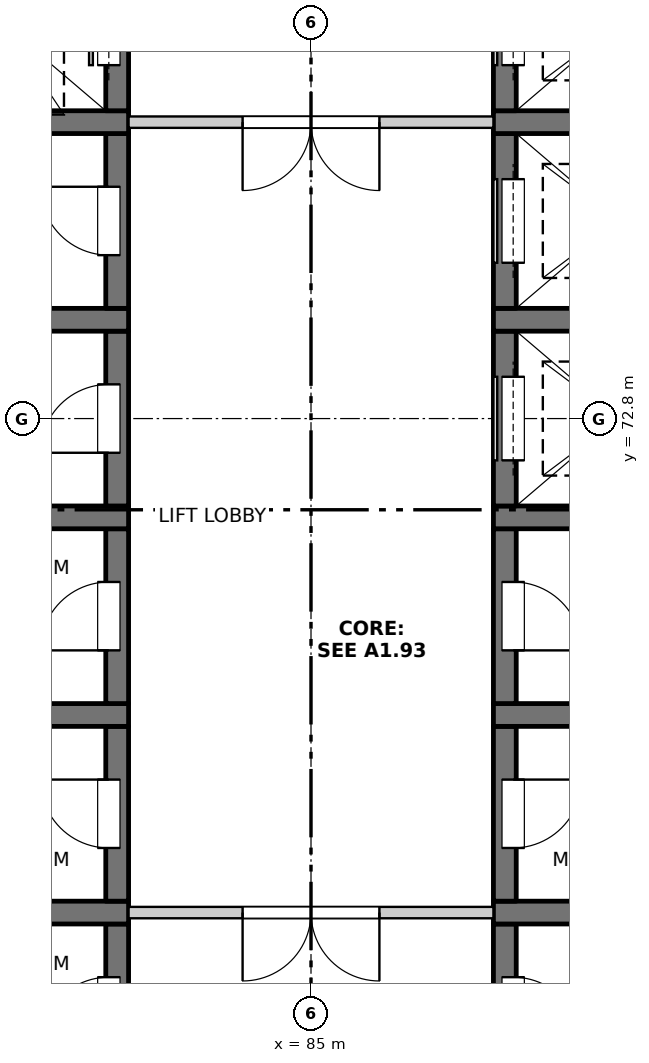
"""IFC4 building model, lengths in metres.
Left out: names, types, materials, properties, quantities, classifications, styles, units other than length and angle.
Written with IfcOpenShell. Run it as: python <this file> out.ifc"""

import sys

from ifc_helpers import new_model, si_unit, direction, frame, frame_2d, origin, place, context, subcontext, project, spatial, rectangle, extrude, element, fill, save


model = new_model("IFC4")
c1 = context("Model", 3, precision=1e-05, world=origin(), true_north=direction((0.0, 1.0)))
c2 = subcontext(c1, "Body", "Model", "MODEL_VIEW")
j1 = project(units=[si_unit("LENGTHUNIT", "METRE"), si_unit("PLANEANGLEUNIT", "RADIAN")], contexts=[c1])
p1 = place(None, origin())
s1 = spatial("IfcSite", under=j1, at=p1, CompositionType="ELEMENT")
p2 = place(p1, origin())
s2 = spatial("IfcBuilding", under=s1, at=p2, CompositionType="ELEMENT")
p3 = place(p2, frame((0.0, 0.0, 155.4)))
s3 = spatial("IfcBuildingStorey", under=s2, at=p3, CompositionType="ELEMENT", Elevation=155.4)
p4 = place(p3, frame((82.45, 63.85, -0.25), z_axis=(0.0, 0.0, 1.0), x_axis=(0.0, 1.0, 0.0)))
e1 = element("IfcWall", 1, at=p4, inside=s3, PredefinedType="SOLIDWALL", context=c2, shape_type="SweptSolid", body=[
    extrude(rectangle(XDim=2.3, YDim=0.3, at=frame_2d((1.15, 0.0))), origin(), (0.0, 0.0, 1.0), 3.4),
])
p5 = place(p4, frame((0.7, 0.0, 0.25)))
e2 = element("IfcOpeningElement", 2, at=p5, cuts=e1, PredefinedType="OPENING", context=c2, shape_type="SweptSolid", body=[
    extrude(rectangle(XDim=0.9, YDim=2.1, at=frame_2d((0.45, 1.05))), frame((0.0, 0.16, 0.0), z_axis=(0.0, -1.0, 0.0), x_axis=(1.0, 0.0, 0.0)), (0.0, 0.0, 1.0), 0.32),
])
p6 = place(p3, frame((79.6, 66.3, -0.25), z_axis=(0.0, 0.0, 1.0), x_axis=(1.0, 0.0, 0.0)))
e3 = element("IfcWall", 3, at=p6, inside=s3, PredefinedType="SOLIDWALL", context=c2, shape_type="SweptSolid", body=[
    extrude(rectangle(XDim=3.0, YDim=0.3, at=frame_2d((1.5, 0.0))), origin(), (0.0, 0.0, 1.0), 3.4),
])
p7 = place(p3, frame((82.45, 66.45, -0.25), z_axis=(0.0, 0.0, 1.0), x_axis=(0.0, 1.0, 0.0)))
e4 = element("IfcWall", 4, at=p7, inside=s3, PredefinedType="SOLIDWALL", context=c2, shape_type="SweptSolid", body=[
    extrude(rectangle(XDim=2.3, YDim=0.3, at=frame_2d((1.15, 0.0))), origin(), (0.0, 0.0, 1.0), 3.4),
])
p8 = place(p7, frame((0.7, 0.0, 0.25)))
e5 = element("IfcOpeningElement", 5, at=p8, cuts=e4, PredefinedType="OPENING", context=c2, shape_type="SweptSolid", body=[
    extrude(rectangle(XDim=0.9, YDim=2.1, at=frame_2d((0.45, 1.05))), frame((0.0, 0.16, 0.0), z_axis=(0.0, -1.0, 0.0), x_axis=(1.0, 0.0, 0.0)), (0.0, 0.0, 1.0), 0.32),
])
p9 = place(p3, frame((79.6, 68.9, -0.25), z_axis=(0.0, 0.0, 1.0), x_axis=(1.0, 0.0, 0.0)))
e6 = element("IfcWall", 6, at=p9, inside=s3, PredefinedType="SOLIDWALL", context=c2, shape_type="SweptSolid", body=[
    extrude(rectangle(XDim=3.0, YDim=0.3, at=frame_2d((1.5, 0.0))), origin(), (0.0, 0.0, 1.0), 3.4),
])
p10 = place(p3, frame((82.45, 69.05, -0.25), z_axis=(0.0, 0.0, 1.0), x_axis=(0.0, 1.0, 0.0)))
e7 = element("IfcWall", 7, at=p10, inside=s3, PredefinedType="SOLIDWALL", context=c2, shape_type="SweptSolid", body=[
    extrude(rectangle(XDim=2.3, YDim=0.3, at=frame_2d((1.15, 0.0))), origin(), (0.0, 0.0, 1.0), 3.4),
])
p11 = place(p10, frame((0.7, 0.0, 0.25)))
e8 = element("IfcOpeningElement", 8, at=p11, cuts=e7, PredefinedType="OPENING", context=c2, shape_type="SweptSolid", body=[
    extrude(rectangle(XDim=0.9, YDim=2.1, at=frame_2d((0.45, 1.05))), frame((0.0, 0.16, 0.0), z_axis=(0.0, -1.0, 0.0), x_axis=(1.0, 0.0, 0.0)), (0.0, 0.0, 1.0), 0.32),
])
p12 = place(p3, frame((79.6, 71.5, -0.25), z_axis=(0.0, 0.0, 1.0), x_axis=(1.0, 0.0, 0.0)))
e9 = element("IfcWall", 9, at=p12, inside=s3, PredefinedType="SOLIDWALL", context=c2, shape_type="SweptSolid", body=[
    extrude(rectangle(XDim=3.0, YDim=0.3, at=frame_2d((1.5, 0.0))), origin(), (0.0, 0.0, 1.0), 3.4),
])
p13 = place(p3, frame((82.45, 71.65, -0.25), z_axis=(0.0, 0.0, 1.0), x_axis=(0.0, 1.0, 0.0)))
e10 = element("IfcWall", 10, at=p13, inside=s3, PredefinedType="SOLIDWALL", context=c2, shape_type="SweptSolid", body=[
    extrude(rectangle(XDim=2.3, YDim=0.3, at=frame_2d((1.15, 0.0))), origin(), (0.0, 0.0, 1.0), 3.4),
])
p14 = place(p13, frame((0.7, 0.0, 0.25)))
e11 = element("IfcOpeningElement", 11, at=p14, cuts=e10, PredefinedType="OPENING", context=c2, shape_type="SweptSolid", body=[
    extrude(rectangle(XDim=0.9, YDim=2.1, at=frame_2d((0.45, 1.05))), frame((0.0, 0.16, 0.0), z_axis=(0.0, -1.0, 0.0), x_axis=(1.0, 0.0, 0.0)), (0.0, 0.0, 1.0), 0.32),
])
p15 = place(p3, frame((79.6, 74.1, -0.25), z_axis=(0.0, 0.0, 1.0), x_axis=(1.0, 0.0, 0.0)))
e12 = element("IfcWall", 12, at=p15, inside=s3, PredefinedType="SOLIDWALL", context=c2, shape_type="SweptSolid", body=[
    extrude(rectangle(XDim=3.0, YDim=0.3, at=frame_2d((1.5, 0.0))), origin(), (0.0, 0.0, 1.0), 3.4),
])
p16 = place(p3, frame((82.45, 74.25, -0.25), z_axis=(0.0, 0.0, 1.0), x_axis=(0.0, 1.0, 0.0)))
e13 = element("IfcWall", 13, at=p16, inside=s3, PredefinedType="SOLIDWALL", context=c2, shape_type="SweptSolid", body=[
    extrude(rectangle(XDim=2.3, YDim=0.3, at=frame_2d((1.15, 0.0))), origin(), (0.0, 0.0, 1.0), 3.4),
])
p17 = place(p16, frame((0.7, 0.0, 0.25)))
e14 = element("IfcOpeningElement", 14, at=p17, cuts=e13, PredefinedType="OPENING", context=c2, shape_type="SweptSolid", body=[
    extrude(rectangle(XDim=0.9, YDim=2.1, at=frame_2d((0.45, 1.05))), frame((0.0, 0.16, 0.0), z_axis=(0.0, -1.0, 0.0), x_axis=(1.0, 0.0, 0.0)), (0.0, 0.0, 1.0), 0.32),
])
p18 = place(p3, frame((79.6, 76.7, -0.25), z_axis=(0.0, 0.0, 1.0), x_axis=(1.0, 0.0, 0.0)))
e15 = element("IfcWall", 15, at=p18, inside=s3, PredefinedType="SOLIDWALL", context=c2, shape_type="SweptSolid", body=[
    extrude(rectangle(XDim=3.0, YDim=0.3, at=frame_2d((1.5, 0.0))), origin(), (0.0, 0.0, 1.0), 3.4),
])
p19 = place(p3, frame((82.45, 76.85, -0.25), z_axis=(0.0, 0.0, 1.0), x_axis=(0.0, 1.0, 0.0)))
e16 = element("IfcWall", 16, at=p19, inside=s3, PredefinedType="SOLIDWALL", context=c2, shape_type="SweptSolid", body=[
    extrude(rectangle(XDim=2.3, YDim=0.3, at=frame_2d((1.15, 0.0))), origin(), (0.0, 0.0, 1.0), 3.4),
])
p20 = place(p19, frame((0.6, 0.0, 0.25)))
e17 = element("IfcOpeningElement", 17, at=p20, cuts=e16, PredefinedType="OPENING", context=c2, shape_type="SweptSolid", body=[
    extrude(rectangle(XDim=1.1, YDim=2.1, at=frame_2d((0.55, 1.05))), frame((0.0, 0.16, 0.0), z_axis=(0.0, -1.0, 0.0), x_axis=(1.0, 0.0, 0.0)), (0.0, 0.0, 1.0), 0.32),
])
p21 = place(p3, frame((87.55, 63.85, -0.25), z_axis=(0.0, 0.0, 1.0), x_axis=(0.0, 1.0, 0.0)))
e18 = element("IfcWall", 18, at=p21, inside=s3, PredefinedType="SOLIDWALL", context=c2, shape_type="SweptSolid", body=[
    extrude(rectangle(XDim=2.3, YDim=0.3, at=frame_2d((1.15, 0.0))), origin(), (0.0, 0.0, 1.0), 3.4),
])
p22 = place(p21, frame((0.7, 0.0, 0.25)))
e19 = element("IfcOpeningElement", 19, at=p22, cuts=e18, PredefinedType="OPENING", context=c2, shape_type="SweptSolid", body=[
    extrude(rectangle(XDim=0.9, YDim=2.1, at=frame_2d((0.45, 1.05))), frame((0.0, 0.16, 0.0), z_axis=(0.0, -1.0, 0.0), x_axis=(1.0, 0.0, 0.0)), (0.0, 0.0, 1.0), 0.32),
])
p23 = place(p3, frame((87.4, 66.3, -0.25), z_axis=(0.0, 0.0, 1.0), x_axis=(1.0, 0.0, 0.0)))
e20 = element("IfcWall", 20, at=p23, inside=s3, PredefinedType="SOLIDWALL", context=c2, shape_type="SweptSolid", body=[
    extrude(rectangle(XDim=3.0, YDim=0.3, at=frame_2d((1.5, 0.0))), origin(), (0.0, 0.0, 1.0), 3.4),
])
p24 = place(p3, frame((87.55, 66.45, -0.25), z_axis=(0.0, 0.0, 1.0), x_axis=(0.0, 1.0, 0.0)))
e21 = element("IfcWall", 21, at=p24, inside=s3, PredefinedType="SOLIDWALL", context=c2, shape_type="SweptSolid", body=[
    extrude(rectangle(XDim=2.3, YDim=0.3, at=frame_2d((1.15, 0.0))), origin(), (0.0, 0.0, 1.0), 3.4),
])
p25 = place(p24, frame((0.7, 0.0, 0.25)))
e22 = element("IfcOpeningElement", 22, at=p25, cuts=e21, PredefinedType="OPENING", context=c2, shape_type="SweptSolid", body=[
    extrude(rectangle(XDim=0.9, YDim=2.1, at=frame_2d((0.45, 1.05))), frame((0.0, 0.16, 0.0), z_axis=(0.0, -1.0, 0.0), x_axis=(1.0, 0.0, 0.0)), (0.0, 0.0, 1.0), 0.32),
])
p26 = place(p3, frame((87.4, 68.9, -0.25), z_axis=(0.0, 0.0, 1.0), x_axis=(1.0, 0.0, 0.0)))
e23 = element("IfcWall", 23, at=p26, inside=s3, PredefinedType="SOLIDWALL", context=c2, shape_type="SweptSolid", body=[
    extrude(rectangle(XDim=3.0, YDim=0.3, at=frame_2d((1.5, 0.0))), origin(), (0.0, 0.0, 1.0), 3.4),
])
p27 = place(p3, frame((87.55, 69.05, -0.25), z_axis=(0.0, 0.0, 1.0), x_axis=(0.0, 1.0, 0.0)))
e24 = element("IfcWall", 24, at=p27, inside=s3, PredefinedType="SOLIDWALL", context=c2, shape_type="SweptSolid", body=[
    extrude(rectangle(XDim=2.3, YDim=0.3, at=frame_2d((1.15, 0.0))), origin(), (0.0, 0.0, 1.0), 3.4),
])
p28 = place(p27, frame((0.7, 0.0, 0.25)))
e25 = element("IfcOpeningElement", 25, at=p28, cuts=e24, PredefinedType="OPENING", context=c2, shape_type="SweptSolid", body=[
    extrude(rectangle(XDim=0.9, YDim=2.1, at=frame_2d((0.45, 1.05))), frame((0.0, 0.16, 0.0), z_axis=(0.0, -1.0, 0.0), x_axis=(1.0, 0.0, 0.0)), (0.0, 0.0, 1.0), 0.32),
])
p29 = place(p3, frame((87.4, 71.5, -0.25), z_axis=(0.0, 0.0, 1.0), x_axis=(1.0, 0.0, 0.0)))
e26 = element("IfcWall", 26, at=p29, inside=s3, PredefinedType="SOLIDWALL", context=c2, shape_type="SweptSolid", body=[
    extrude(rectangle(XDim=3.0, YDim=0.3, at=frame_2d((1.5, 0.0))), origin(), (0.0, 0.0, 1.0), 3.4),
])
p30 = place(p3, frame((87.55, 71.65, -0.25), z_axis=(0.0, 0.0, 1.0), x_axis=(0.0, 1.0, 0.0)))
e27 = element("IfcWall", 27, at=p30, inside=s3, PredefinedType="SOLIDWALL", context=c2, shape_type="SweptSolid", body=[
    extrude(rectangle(XDim=2.3, YDim=0.3, at=frame_2d((1.15, 0.0))), origin(), (0.0, 0.0, 1.0), 3.4),
])
p31 = place(p30, frame((0.6, 0.0, 0.25)))
e28 = element("IfcOpeningElement", 28, at=p31, cuts=e27, PredefinedType="OPENING", context=c2, shape_type="SweptSolid", body=[
    extrude(rectangle(XDim=1.1, YDim=2.1, at=frame_2d((0.55, 1.05))), frame((0.0, 0.16, 0.0), z_axis=(0.0, -1.0, 0.0), x_axis=(1.0, 0.0, 0.0)), (0.0, 0.0, 1.0), 0.32),
])
p32 = place(p3, frame((87.4, 74.1, -0.25), z_axis=(0.0, 0.0, 1.0), x_axis=(1.0, 0.0, 0.0)))
e29 = element("IfcWall", 29, at=p32, inside=s3, PredefinedType="SOLIDWALL", context=c2, shape_type="SweptSolid", body=[
    extrude(rectangle(XDim=3.0, YDim=0.3, at=frame_2d((1.5, 0.0))), origin(), (0.0, 0.0, 1.0), 3.4),
])
p33 = place(p3, frame((87.55, 74.25, -0.25), z_axis=(0.0, 0.0, 1.0), x_axis=(0.0, 1.0, 0.0)))
e30 = element("IfcWall", 30, at=p33, inside=s3, PredefinedType="SOLIDWALL", context=c2, shape_type="SweptSolid", body=[
    extrude(rectangle(XDim=2.3, YDim=0.3, at=frame_2d((1.15, 0.0))), origin(), (0.0, 0.0, 1.0), 3.4),
])
p34 = place(p33, frame((0.6, 0.0, 0.25)))
e31 = element("IfcOpeningElement", 31, at=p34, cuts=e30, PredefinedType="OPENING", context=c2, shape_type="SweptSolid", body=[
    extrude(rectangle(XDim=1.1, YDim=2.1, at=frame_2d((0.55, 1.05))), frame((0.0, 0.16, 0.0), z_axis=(0.0, -1.0, 0.0), x_axis=(1.0, 0.0, 0.0)), (0.0, 0.0, 1.0), 0.32),
])
p35 = place(p3, frame((87.4, 76.7, -0.25), z_axis=(0.0, 0.0, 1.0), x_axis=(1.0, 0.0, 0.0)))
e32 = element("IfcWall", 32, at=p35, inside=s3, PredefinedType="SOLIDWALL", context=c2, shape_type="SweptSolid", body=[
    extrude(rectangle(XDim=3.0, YDim=0.3, at=frame_2d((1.5, 0.0))), origin(), (0.0, 0.0, 1.0), 3.4),
])
p36 = place(p3, frame((87.55, 76.85, -0.25), z_axis=(0.0, 0.0, 1.0), x_axis=(0.0, 1.0, 0.0)))
e33 = element("IfcWall", 33, at=p36, inside=s3, PredefinedType="SOLIDWALL", context=c2, shape_type="SweptSolid", body=[
    extrude(rectangle(XDim=2.3, YDim=0.3, at=frame_2d((1.15, 0.0))), origin(), (0.0, 0.0, 1.0), 3.4),
])
p37 = place(p36, frame((0.6, 0.0, 0.25)))
e34 = element("IfcOpeningElement", 34, at=p37, cuts=e33, PredefinedType="OPENING", context=c2, shape_type="SweptSolid", body=[
    extrude(rectangle(XDim=1.1, YDim=2.1, at=frame_2d((0.55, 1.05))), frame((0.0, 0.16, 0.0), z_axis=(0.0, -1.0, 0.0), x_axis=(1.0, 0.0, 0.0)), (0.0, 0.0, 1.0), 0.32),
])
p38 = place(p3, frame((82.6, 66.3, 0.0), z_axis=(0.0, 0.0, 1.0), x_axis=(1.0, 0.0, 0.0)))
e35 = element("IfcWall", 35, at=p38, inside=s3, PredefinedType="PARTITIONING", context=c2, shape_type="SweptSolid", body=[
    extrude(rectangle(XDim=4.8, YDim=0.15, at=frame_2d((2.4, 0.0))), origin(), (0.0, 0.0, 1.0), 3.15),
])
p39 = place(p38, frame((1.5, 0.0, 0.0)))
e36 = element("IfcOpeningElement", 36, at=p39, cuts=e35, PredefinedType="OPENING", context=c2, shape_type="SweptSolid", body=[
    extrude(rectangle(XDim=1.8, YDim=2.1, at=frame_2d((0.9, 1.05))), frame((0.0, 0.085, 0.0), z_axis=(0.0, -1.0, 0.0), x_axis=(1.0, 0.0, 0.0)), (0.0, 0.0, 1.0), 0.17),
])
p40 = place(p3, frame((82.6, 76.7, 0.0), z_axis=(0.0, 0.0, 1.0), x_axis=(1.0, 0.0, 0.0)))
e37 = element("IfcWall", 37, at=p40, inside=s3, PredefinedType="PARTITIONING", context=c2, shape_type="SweptSolid", body=[
    extrude(rectangle(XDim=4.8, YDim=0.15, at=frame_2d((2.4, 0.0))), origin(), (0.0, 0.0, 1.0), 3.15),
])
p41 = place(p40, frame((1.5, 0.0, 0.0)))
e38 = element("IfcOpeningElement", 38, at=p41, cuts=e37, PredefinedType="OPENING", context=c2, shape_type="SweptSolid", body=[
    extrude(rectangle(XDim=1.8, YDim=2.1, at=frame_2d((0.9, 1.05))), frame((0.0, 0.085, 0.0), z_axis=(0.0, -1.0, 0.0), x_axis=(1.0, 0.0, 0.0)), (0.0, 0.0, 1.0), 0.17),
])
p42 = place(p5, origin())
e39 = element("IfcDoor", 39, at=p42, inside=s3, OperationType="SINGLE_SWING_LEFT", PredefinedType="DOOR", context=c2, shape_type="SweptSolid", body=[
    extrude(rectangle(XDim=0.9, YDim=2.1, at=frame_2d((0.45, 1.05))), frame((0.0, 0.135, 0.0), z_axis=(0.0, -1.0, 0.0), x_axis=(1.0, 0.0, 0.0)), (0.0, 0.0, 1.0), 0.05),
])
fill(e2, e39)
p43 = place(p22, origin())
e40 = element("IfcDoor", 40, at=p43, inside=s3, OperationType="SINGLE_SWING_RIGHT", PredefinedType="DOOR", context=c2, shape_type="SweptSolid", body=[
    extrude(rectangle(XDim=0.9, YDim=2.1, at=frame_2d((0.45, 1.05))), frame((0.0, -0.085, 0.0), z_axis=(0.0, -1.0, 0.0), x_axis=(1.0, 0.0, 0.0)), (0.0, 0.0, 1.0), 0.05),
])
fill(e19, e40)
p44 = place(p39, origin())
e41 = element("IfcDoor", 41, at=p44, inside=s3, OperationType="DOUBLE_DOOR_SINGLE_SWING", PredefinedType="DOOR", context=c2, shape_type="SweptSolid", body=[
    extrude(rectangle(XDim=1.8, YDim=2.1, at=frame_2d((0.9, 1.05))), frame((0.0, 0.025, 0.0), z_axis=(0.0, -1.0, 0.0), x_axis=(1.0, 0.0, 0.0)), (0.0, 0.0, 1.0), 0.05),
])
fill(e36, e41)
p45 = place(p8, origin())
e42 = element("IfcDoor", 42, at=p45, inside=s3, OperationType="SINGLE_SWING_RIGHT", PredefinedType="DOOR", context=c2, shape_type="SweptSolid", body=[
    extrude(rectangle(XDim=0.9, YDim=2.1, at=frame_2d((0.45, 1.05))), frame((0.0, 0.135, 0.0), z_axis=(0.0, -1.0, 0.0), x_axis=(1.0, 0.0, 0.0)), (0.0, 0.0, 1.0), 0.05),
])
fill(e5, e42)
p46 = place(p25, origin())
e43 = element("IfcDoor", 43, at=p46, inside=s3, OperationType="SINGLE_SWING_LEFT", PredefinedType="DOOR", context=c2, shape_type="SweptSolid", body=[
    extrude(rectangle(XDim=0.9, YDim=2.1, at=frame_2d((0.45, 1.05))), frame((0.0, -0.085, 0.0), z_axis=(0.0, -1.0, 0.0), x_axis=(1.0, 0.0, 0.0)), (0.0, 0.0, 1.0), 0.05),
])
fill(e22, e43)
p47 = place(p11, origin())
e44 = element("IfcDoor", 44, at=p47, inside=s3, OperationType="SINGLE_SWING_LEFT", PredefinedType="DOOR", context=c2, shape_type="SweptSolid", body=[
    extrude(rectangle(XDim=0.9, YDim=2.1, at=frame_2d((0.45, 1.05))), frame((0.0, 0.135, 0.0), z_axis=(0.0, -1.0, 0.0), x_axis=(1.0, 0.0, 0.0)), (0.0, 0.0, 1.0), 0.05),
])
fill(e8, e44)
p48 = place(p28, origin())
e45 = element("IfcDoor", 45, at=p48, inside=s3, OperationType="SINGLE_SWING_RIGHT", PredefinedType="DOOR", context=c2, shape_type="SweptSolid", body=[
    extrude(rectangle(XDim=0.9, YDim=2.1, at=frame_2d((0.45, 1.05))), frame((0.0, -0.085, 0.0), z_axis=(0.0, -1.0, 0.0), x_axis=(1.0, 0.0, 0.0)), (0.0, 0.0, 1.0), 0.05),
])
fill(e25, e45)
p49 = place(p14, origin())
e46 = element("IfcDoor", 46, at=p49, inside=s3, OperationType="SINGLE_SWING_LEFT", PredefinedType="DOOR", context=c2, shape_type="SweptSolid", body=[
    extrude(rectangle(XDim=0.9, YDim=2.1, at=frame_2d((0.45, 1.05))), frame((0.0, 0.135, 0.0), z_axis=(0.0, -1.0, 0.0), x_axis=(1.0, 0.0, 0.0)), (0.0, 0.0, 1.0), 0.05),
])
fill(e11, e46)
p50 = place(p31, origin())
e47 = element("IfcDoor", 47, at=p50, inside=s3, OperationType="SLIDING_TO_LEFT", PredefinedType="DOOR", context=c2, shape_type="SweptSolid", body=[
    extrude(rectangle(XDim=1.1, YDim=2.1, at=frame_2d((0.55, 1.05))), frame((0.0, -0.085, 0.0), z_axis=(0.0, -1.0, 0.0), x_axis=(1.0, 0.0, 0.0)), (0.0, 0.0, 1.0), 0.05),
])
fill(e28, e47)
p51 = place(p17, origin())
e48 = element("IfcDoor", 48, at=p51, inside=s3, OperationType="SINGLE_SWING_RIGHT", PredefinedType="DOOR", context=c2, shape_type="SweptSolid", body=[
    extrude(rectangle(XDim=0.9, YDim=2.1, at=frame_2d((0.45, 1.05))), frame((0.0, 0.135, 0.0), z_axis=(0.0, -1.0, 0.0), x_axis=(1.0, 0.0, 0.0)), (0.0, 0.0, 1.0), 0.05),
])
fill(e14, e48)
p52 = place(p34, origin())
e49 = element("IfcDoor", 49, at=p52, inside=s3, OperationType="SLIDING_TO_LEFT", PredefinedType="DOOR", context=c2, shape_type="SweptSolid", body=[
    extrude(rectangle(XDim=1.1, YDim=2.1, at=frame_2d((0.55, 1.05))), frame((0.0, -0.085, 0.0), z_axis=(0.0, -1.0, 0.0), x_axis=(1.0, 0.0, 0.0)), (0.0, 0.0, 1.0), 0.05),
])
fill(e31, e49)
p53 = place(p41, origin())
e50 = element("IfcDoor", 50, at=p53, inside=s3, OperationType="DOUBLE_DOOR_SINGLE_SWING", PredefinedType="DOOR", context=c2, shape_type="SweptSolid", body=[
    extrude(rectangle(XDim=1.8, YDim=2.1, at=frame_2d((0.9, 1.05))), frame((0.0, 0.025, 0.0), z_axis=(0.0, -1.0, 0.0), x_axis=(1.0, 0.0, 0.0)), (0.0, 0.0, 1.0), 0.05),
])
fill(e38, e50)
p54 = place(p20, origin())
e51 = element("IfcDoor", 51, at=p54, inside=s3, OperationType="SLIDING_TO_LEFT", PredefinedType="DOOR", context=c2, shape_type="SweptSolid", body=[
    extrude(rectangle(XDim=1.1, YDim=2.1, at=frame_2d((0.55, 1.05))), frame((0.0, 0.135, 0.0), z_axis=(0.0, -1.0, 0.0), x_axis=(1.0, 0.0, 0.0)), (0.0, 0.0, 1.0), 0.05),
])
fill(e17, e51)
p55 = place(p37, origin())
e52 = element("IfcDoor", 52, at=p55, inside=s3, OperationType="SLIDING_TO_LEFT", PredefinedType="DOOR", context=c2, shape_type="SweptSolid", body=[
    extrude(rectangle(XDim=1.1, YDim=2.1, at=frame_2d((0.55, 1.05))), frame((0.0, -0.085, 0.0), z_axis=(0.0, -1.0, 0.0), x_axis=(1.0, 0.0, 0.0)), (0.0, 0.0, 1.0), 0.05),
])
fill(e34, e52)
save(model, sys.argv[1])
